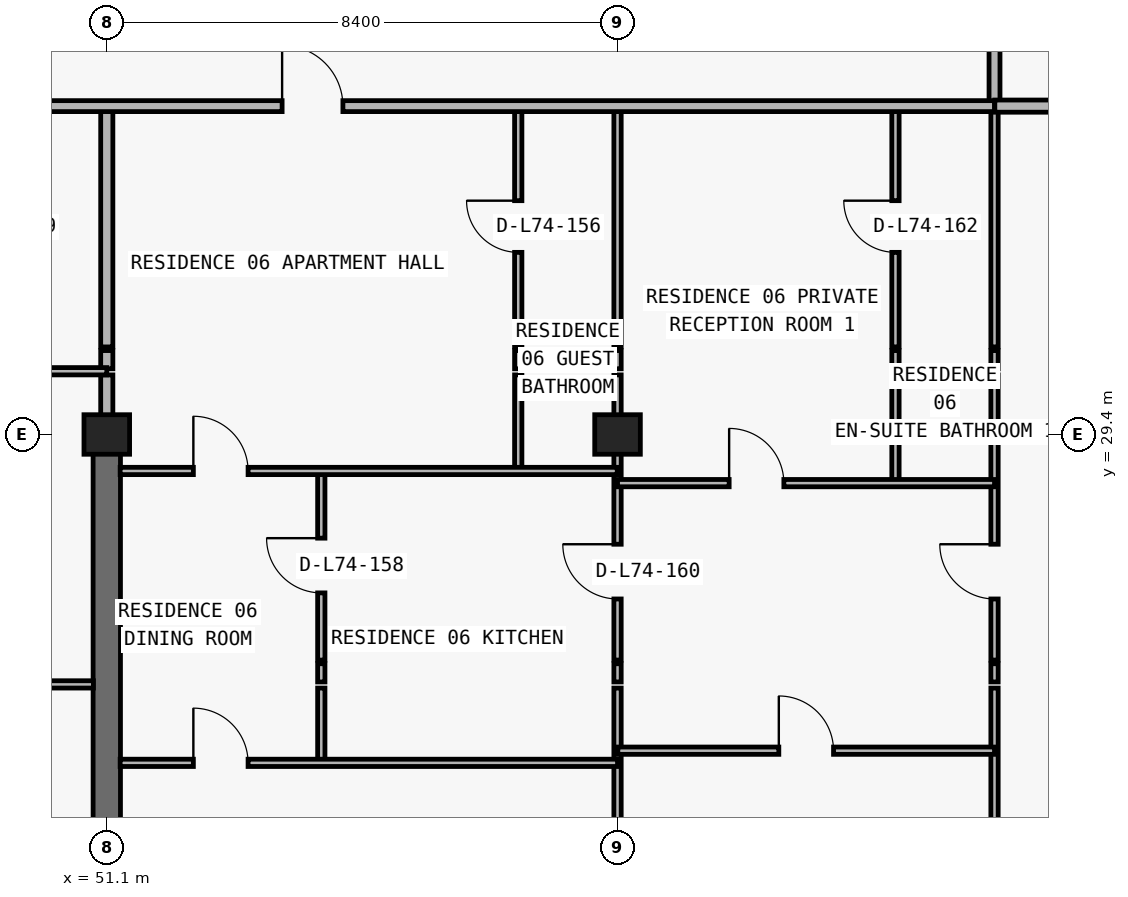
"""IFC4 building model, lengths in metres.
Left out: names, types, materials, properties, quantities, classifications, styles, units other than length and angle.
Written with IfcOpenShell. Run it as: python <this file> out.ifc"""

import sys

from ifc_helpers import new_model, si_unit, direction, frame, frame_2d, origin, origin_2d, place, context, subcontext, project, spatial, rectangle, extrude, element, fill, save


model = new_model("IFC4")
c1 = context("Model", 3, precision=1e-05, world=origin(), true_north=direction((0.0, 1.0)))
c2 = subcontext(c1, "Body", "Model", "MODEL_VIEW")
j1 = project(units=[si_unit("LENGTHUNIT", "METRE"), si_unit("PLANEANGLEUNIT", "RADIAN")], contexts=[c1])
p1 = place(None, origin())
s1 = spatial("IfcSite", under=j1, at=p1, CompositionType="ELEMENT")
p2 = place(p1, origin())
s2 = spatial("IfcBuilding", under=s1, at=p2, CompositionType="ELEMENT")
p3 = place(p2, frame((0.0, 0.0, 262.8)))
s3 = spatial("IfcBuildingStorey", under=s2, at=p3, CompositionType="ELEMENT", Elevation=262.8)
for number, where, z_axis, x_axis in (
    (1, (51.1, 29.4, 0.0), (0.0, 0.0, 1.0), (1.0, 0.0, 0.0)),
    (2, (59.5, 29.4, 0.0), (0.0, 0.0, 1.0), (1.0, 0.0, 0.0)),
):
    element("IfcColumn", number, at=place(p3, frame(where, z_axis=z_axis, x_axis=x_axis)), inside=s3, PredefinedType="COLUMN", context=c2, shape_type="SweptSolid", body=[
        extrude(rectangle(XDim=0.75, YDim=0.65, at=origin_2d()), origin(), (0.0, 0.0, 1.0), 3.05),
    ])
p4 = place(p3, frame((51.1, 20.8, 0.0), z_axis=(0.0, 0.0, 1.0), x_axis=(0.0, 1.0, 0.0)))
e3 = element("IfcWall", 3, at=p4, inside=s3, PredefinedType="SHEAR", context=c2, shape_type="SweptSolid", body=[
    extrude(rectangle(XDim=8.6, YDim=0.45, at=frame_2d((4.3, 0.0))), origin(), (0.0, 0.0, 1.0), 3.05),
])
p5 = place(p3, frame((51.1, 29.405, 0.0), z_axis=(0.0, 0.0, 1.0), x_axis=(0.0, 1.0, 0.0)))
e4 = element("IfcWall", 4, at=p5, inside=s3, PredefinedType="PARTITIONING", context=c2, shape_type="SweptSolid", body=[
    extrude(rectangle(XDim=0.975, YDim=0.2, at=frame_2d((0.487, 0.0))), origin(), (0.0, 0.0, 1.0), 2.335),
])
p6 = place(p3, frame((51.1, 30.48, 0.0), z_axis=(0.0, 0.0, 1.0), x_axis=(0.0, 1.0, 0.0)))
e5 = element("IfcWall", 5, at=p6, inside=s3, PredefinedType="PARTITIONING", context=c2, shape_type="SweptSolid", body=[
    extrude(rectangle(XDim=0.3, YDim=0.2, at=frame_2d((0.15, 0.0))), origin(), (0.0, 0.0, 1.0), 2.335),
])
p7 = place(p3, frame((51.1, 30.84, 0.0), z_axis=(0.0, 0.0, 1.0), x_axis=(0.0, 1.0, 0.0)))
e6 = element("IfcWall", 6, at=p7, inside=s3, PredefinedType="PARTITIONING", context=c2, shape_type="SweptSolid", body=[
    extrude(rectangle(XDim=3.96, YDim=0.2, at=frame_2d((1.98, 0.0))), origin(), (0.0, 0.0, 1.0), 2.335),
])
p8 = place(p3, frame((54.628, 24.0, 0.0), z_axis=(0.0, 0.0, 1.0), x_axis=(0.0, 1.0, 0.0)))
e7 = element("IfcWall", 7, at=p8, inside=s3, PredefinedType="PARTITIONING", context=c2, shape_type="SweptSolid", body=[
    extrude(rectangle(XDim=1.23, YDim=0.12, at=frame_2d((0.615, 0.0))), origin(), (0.0, 0.0, 1.0), 3.05),
])
p9 = place(p3, frame((54.628, 25.33, 0.0), z_axis=(0.0, 0.0, 1.0), x_axis=(0.0, 1.0, 0.0)))
e8 = element("IfcWall", 8, at=p9, inside=s3, PredefinedType="PARTITIONING", context=c2, shape_type="SweptSolid", body=[
    extrude(rectangle(XDim=0.3, YDim=0.12, at=frame_2d((0.15, 0.0))), origin(), (0.0, 0.0, 1.0), 3.05),
])
p10 = place(p3, frame((54.628, 25.69, 0.0), z_axis=(0.0, 0.0, 1.0), x_axis=(0.0, 1.0, 0.0)))
e9 = element("IfcWall", 9, at=p10, inside=s3, PredefinedType="PARTITIONING", context=c2, shape_type="SweptSolid", body=[
    extrude(rectangle(XDim=3.11, YDim=0.12, at=frame_2d((1.555, 0.0))), origin(), (0.0, 0.0, 1.0), 3.05),
])
p11 = place(p10, frame((1.105, 0.0, 0.0)))
e10 = element("IfcOpeningElement", 10, at=p11, cuts=e9, PredefinedType="OPENING", context=c2, shape_type="SweptSolid", body=[
    extrude(rectangle(XDim=0.9, YDim=2.15, at=frame_2d((0.45, 1.075))), frame((0.0, 0.07, 0.0), z_axis=(0.0, -1.0, 0.0), x_axis=(1.0, 0.0, 0.0)), (0.0, 0.0, 1.0), 0.14),
])
p12 = place(p3, frame((57.867, 28.8, 0.0), z_axis=(0.0, 0.0, 1.0), x_axis=(0.0, 1.0, 0.0)))
e11 = element("IfcWall", 11, at=p12, inside=s3, PredefinedType="PARTITIONING", context=c2, shape_type="SweptSolid", body=[
    extrude(rectangle(XDim=1.58, YDim=0.12, at=frame_2d((0.79, 0.0))), origin(), (0.0, 0.0, 1.0), 3.05),
])
p13 = place(p3, frame((57.867, 30.48, 0.0), z_axis=(0.0, 0.0, 1.0), x_axis=(0.0, 1.0, 0.0)))
e12 = element("IfcWall", 12, at=p13, inside=s3, PredefinedType="PARTITIONING", context=c2, shape_type="SweptSolid", body=[
    extrude(rectangle(XDim=0.3, YDim=0.12, at=frame_2d((0.15, 0.0))), origin(), (0.0, 0.0, 1.0), 3.05),
])
p14 = place(p3, frame((57.867, 30.84, 0.0), z_axis=(0.0, 0.0, 1.0), x_axis=(0.0, 1.0, 0.0)))
e13 = element("IfcWall", 13, at=p14, inside=s3, PredefinedType="PARTITIONING", context=c2, shape_type="SweptSolid", body=[
    extrude(rectangle(XDim=3.96, YDim=0.12, at=frame_2d((1.98, 0.0))), origin(), (0.0, 0.0, 1.0), 3.05),
])
p15 = place(p14, frame((1.555, 0.0, 0.0)))
e14 = element("IfcOpeningElement", 14, at=p15, cuts=e13, PredefinedType="OPENING", context=c2, shape_type="SweptSolid", body=[
    extrude(rectangle(XDim=0.85, YDim=2.1, at=frame_2d((0.425, 1.05))), frame((0.0, 0.07, 0.0), z_axis=(0.0, -1.0, 0.0), x_axis=(1.0, 0.0, 0.0)), (0.0, 0.0, 1.0), 0.14),
])
p16 = place(p3, frame((59.5, 13.34, 0.0), z_axis=(0.0, 0.0, 1.0), x_axis=(0.0, 1.0, 0.0)))
e15 = element("IfcWall", 15, at=p16, inside=s3, PredefinedType="PARTITIONING", context=c2, shape_type="SweptSolid", body=[
    extrude(rectangle(XDim=11.89, YDim=0.12, at=frame_2d((5.945, 0.0))), origin(), (0.0, 0.0, 1.0), 2.263),
])
p17 = place(p3, frame((59.5, 25.33, 0.0), z_axis=(0.0, 0.0, 1.0), x_axis=(0.0, 1.0, 0.0)))
e16 = element("IfcWall", 16, at=p17, inside=s3, PredefinedType="PARTITIONING", context=c2, shape_type="SweptSolid", body=[
    extrude(rectangle(XDim=0.3, YDim=0.12, at=frame_2d((0.15, 0.0))), origin(), (0.0, 0.0, 1.0), 2.263),
])
p18 = place(p3, frame((59.5, 25.69, 0.0), z_axis=(0.0, 0.0, 1.0), x_axis=(0.0, 1.0, 0.0)))
e17 = element("IfcWall", 17, at=p18, inside=s3, PredefinedType="PARTITIONING", context=c2, shape_type="SweptSolid", body=[
    extrude(rectangle(XDim=4.69, YDim=0.12, at=frame_2d((2.345, 0.0))), origin(), (0.0, 0.0, 1.0), 2.263),
])
p19 = place(p18, frame((1.005, 0.0, 0.0)))
e18 = element("IfcOpeningElement", 18, at=p19, cuts=e17, PredefinedType="OPENING", context=c2, shape_type="SweptSolid", body=[
    extrude(rectangle(XDim=0.9, YDim=2.15, at=frame_2d((0.45, 1.075))), frame((0.0, 0.07, 0.0), z_axis=(0.0, -1.0, 0.0), x_axis=(1.0, 0.0, 0.0)), (0.0, 0.0, 1.0), 0.14),
])
p20 = place(p3, frame((59.5, 30.48, 0.0), z_axis=(0.0, 0.0, 1.0), x_axis=(0.0, 1.0, 0.0)))
e19 = element("IfcWall", 19, at=p20, inside=s3, PredefinedType="PARTITIONING", context=c2, shape_type="SweptSolid", body=[
    extrude(rectangle(XDim=0.3, YDim=0.12, at=frame_2d((0.15, 0.0))), origin(), (0.0, 0.0, 1.0), 2.263),
])
p21 = place(p3, frame((59.5, 30.84, 0.0), z_axis=(0.0, 0.0, 1.0), x_axis=(0.0, 1.0, 0.0)))
e20 = element("IfcWall", 20, at=p21, inside=s3, PredefinedType="PARTITIONING", context=c2, shape_type="SweptSolid", body=[
    extrude(rectangle(XDim=3.96, YDim=0.12, at=frame_2d((1.98, 0.0))), origin(), (0.0, 0.0, 1.0), 2.263),
])
p22 = place(p3, frame((64.071, 28.6, 0.0), z_axis=(0.0, 0.0, 1.0), x_axis=(0.0, 1.0, 0.0)))
e21 = element("IfcWall", 21, at=p22, inside=s3, PredefinedType="PARTITIONING", context=c2, shape_type="SweptSolid", body=[
    extrude(rectangle(XDim=1.78, YDim=0.12, at=frame_2d((0.89, 0.0))), origin(), (0.0, 0.0, 1.0), 3.05),
])
p23 = place(p3, frame((64.071, 30.48, 0.0), z_axis=(0.0, 0.0, 1.0), x_axis=(0.0, 1.0, 0.0)))
e22 = element("IfcWall", 22, at=p23, inside=s3, PredefinedType="PARTITIONING", context=c2, shape_type="SweptSolid", body=[
    extrude(rectangle(XDim=0.3, YDim=0.12, at=frame_2d((0.15, 0.0))), origin(), (0.0, 0.0, 1.0), 3.05),
])
p24 = place(p3, frame((64.071, 30.84, 0.0), z_axis=(0.0, 0.0, 1.0), x_axis=(0.0, 1.0, 0.0)))
e23 = element("IfcWall", 23, at=p24, inside=s3, PredefinedType="PARTITIONING", context=c2, shape_type="SweptSolid", body=[
    extrude(rectangle(XDim=3.96, YDim=0.12, at=frame_2d((1.98, 0.0))), origin(), (0.0, 0.0, 1.0), 3.05),
])
p25 = place(p24, frame((1.555, 0.0, 0.0)))
e24 = element("IfcOpeningElement", 24, at=p25, cuts=e23, PredefinedType="OPENING", context=c2, shape_type="SweptSolid", body=[
    extrude(rectangle(XDim=0.85, YDim=2.1, at=frame_2d((0.425, 1.05))), frame((0.0, 0.07, 0.0), z_axis=(0.0, -1.0, 0.0), x_axis=(1.0, 0.0, 0.0)), (0.0, 0.0, 1.0), 0.14),
])
p26 = place(p3, frame((65.7, 13.42, 0.0), z_axis=(0.0, 0.0, 1.0), x_axis=(0.0, 1.0, 0.0)))
e25 = element("IfcWall", 25, at=p26, inside=s3, PredefinedType="PARTITIONING", context=c2, shape_type="SweptSolid", body=[
    extrude(rectangle(XDim=11.81, YDim=0.12, at=frame_2d((5.905, 0.0))), origin(), (0.0, 0.0, 1.0), 2.629),
])
p27 = place(p3, frame((65.7, 25.33, 0.0), z_axis=(0.0, 0.0, 1.0), x_axis=(0.0, 1.0, 0.0)))
e26 = element("IfcWall", 26, at=p27, inside=s3, PredefinedType="PARTITIONING", context=c2, shape_type="SweptSolid", body=[
    extrude(rectangle(XDim=0.3, YDim=0.12, at=frame_2d((0.15, 0.0))), origin(), (0.0, 0.0, 1.0), 2.629),
])
p28 = place(p3, frame((65.7, 25.69, 0.0), z_axis=(0.0, 0.0, 1.0), x_axis=(0.0, 1.0, 0.0)))
e27 = element("IfcWall", 27, at=p28, inside=s3, PredefinedType="PARTITIONING", context=c2, shape_type="SweptSolid", body=[
    extrude(rectangle(XDim=4.69, YDim=0.12, at=frame_2d((2.345, 0.0))), origin(), (0.0, 0.0, 1.0), 2.629),
])
p29 = place(p28, frame((1.005, 0.0, 0.0)))
e28 = element("IfcOpeningElement", 28, at=p29, cuts=e27, PredefinedType="OPENING", context=c2, shape_type="SweptSolid", body=[
    extrude(rectangle(XDim=0.9, YDim=2.15, at=frame_2d((0.45, 1.075))), frame((0.0, 0.07, 0.0), z_axis=(0.0, -1.0, 0.0), x_axis=(1.0, 0.0, 0.0)), (0.0, 0.0, 1.0), 0.14),
])
p30 = place(p3, frame((65.7, 30.48, 0.0), z_axis=(0.0, 0.0, 1.0), x_axis=(0.0, 1.0, 0.0)))
e29 = element("IfcWall", 29, at=p30, inside=s3, PredefinedType="PARTITIONING", context=c2, shape_type="SweptSolid", body=[
    extrude(rectangle(XDim=0.3, YDim=0.12, at=frame_2d((0.15, 0.0))), origin(), (0.0, 0.0, 1.0), 2.629),
])
p31 = place(p3, frame((65.7, 30.84, 0.0), z_axis=(0.0, 0.0, 1.0), x_axis=(0.0, 1.0, 0.0)))
e30 = element("IfcWall", 30, at=p31, inside=s3, PredefinedType="PARTITIONING", context=c2, shape_type="SweptSolid", body=[
    extrude(rectangle(XDim=3.96, YDim=0.12, at=frame_2d((1.98, 0.0))), origin(), (0.0, 0.0, 1.0), 2.629),
])
p32 = place(p3, frame((65.7, 34.805, 0.0), z_axis=(0.0, 0.0, 1.0), x_axis=(0.0, 1.0, 0.0)))
e31 = element("IfcWall", 31, at=p32, inside=s3, PredefinedType="PARTITIONING", context=c2, shape_type="SweptSolid", body=[
    extrude(rectangle(XDim=2.195, YDim=0.18, at=frame_2d((1.098, 0.0))), origin(), (0.0, 0.0, 1.0), 2.629),
])
p33 = place(p3, frame((51.32, 24.0, 0.0), z_axis=(0.0, 0.0, 1.0), x_axis=(1.0, 0.0, 0.0)))
e32 = element("IfcWall", 32, at=p33, inside=s3, PredefinedType="PARTITIONING", context=c2, shape_type="SweptSolid", body=[
    extrude(rectangle(XDim=8.18, YDim=0.12, at=frame_2d((4.09, 0.0))), origin(), (0.0, 0.0, 1.0), 3.05),
])
p34 = place(p33, frame((1.204, 0.0, 0.0)))
e33 = element("IfcOpeningElement", 33, at=p34, cuts=e32, PredefinedType="OPENING", context=c2, shape_type="SweptSolid", body=[
    extrude(rectangle(XDim=0.9, YDim=2.15, at=frame_2d((0.45, 1.075))), frame((0.0, 0.07, 0.0), z_axis=(0.0, -1.0, 0.0), x_axis=(1.0, 0.0, 0.0)), (0.0, 0.0, 1.0), 0.14),
])
p35 = place(p3, frame((59.505, 24.2, 0.0), z_axis=(0.0, 0.0, 1.0), x_axis=(1.0, 0.0, 0.0)))
e34 = element("IfcWall", 34, at=p35, inside=s3, PredefinedType="PARTITIONING", context=c2, shape_type="SweptSolid", body=[
    extrude(rectangle(XDim=6.195, YDim=0.12, at=frame_2d((3.098, 0.0))), origin(), (0.0, 0.0, 1.0), 3.05),
])
p36 = place(p35, frame((2.647, 0.0, 0.0)))
e35 = element("IfcOpeningElement", 35, at=p36, cuts=e34, PredefinedType="OPENING", context=c2, shape_type="SweptSolid", body=[
    extrude(rectangle(XDim=0.9, YDim=2.15, at=frame_2d((0.45, 1.075))), frame((0.0, 0.07, 0.0), z_axis=(0.0, -1.0, 0.0), x_axis=(1.0, 0.0, 0.0)), (0.0, 0.0, 1.0), 0.14),
])
p37 = place(p3, frame((42.7, 25.29, 0.0), z_axis=(0.0, 0.0, 1.0), x_axis=(1.0, 0.0, 0.0)))
e36 = element("IfcWall", 36, at=p37, inside=s3, PredefinedType="PARTITIONING", context=c2, shape_type="SweptSolid", body=[
    extrude(rectangle(XDim=8.18, YDim=0.12, at=frame_2d((4.09, 0.0))), origin(), (0.0, 0.0, 1.0), 3.05),
])
p38 = place(p37, frame((1.524, 0.0, 0.0)))
e37 = element("IfcOpeningElement", 37, at=p38, cuts=e36, PredefinedType="OPENING", context=c2, shape_type="SweptSolid", body=[
    extrude(rectangle(XDim=0.9, YDim=2.15, at=frame_2d((0.45, 1.075))), frame((0.0, 0.07, 0.0), z_axis=(0.0, -1.0, 0.0), x_axis=(1.0, 0.0, 0.0)), (0.0, 0.0, 1.0), 0.14),
])
p39 = place(p37, frame((5.908, 0.0, 0.0)))
e38 = element("IfcOpeningElement", 38, at=p39, cuts=e36, PredefinedType="OPENING", context=c2, shape_type="SweptSolid", body=[
    extrude(rectangle(XDim=0.9, YDim=2.15, at=frame_2d((0.45, 1.075))), frame((0.0, 0.07, 0.0), z_axis=(0.0, -1.0, 0.0), x_axis=(1.0, 0.0, 0.0)), (0.0, 0.0, 1.0), 0.14),
])
p40 = place(p3, frame((59.5, 28.6, 0.0), z_axis=(0.0, 0.0, 1.0), x_axis=(1.0, 0.0, 0.0)))
e39 = element("IfcWall", 39, at=p40, inside=s3, PredefinedType="PARTITIONING", context=c2, shape_type="SweptSolid", body=[
    extrude(rectangle(XDim=6.2, YDim=0.12, at=frame_2d((3.1, 0.0))), origin(), (0.0, 0.0, 1.0), 3.05),
])
p41 = place(p40, frame((1.835, 0.0, 0.0)))
e40 = element("IfcOpeningElement", 40, at=p41, cuts=e39, PredefinedType="OPENING", context=c2, shape_type="SweptSolid", body=[
    extrude(rectangle(XDim=0.9, YDim=2.15, at=frame_2d((0.45, 1.075))), frame((0.0, 0.07, 0.0), z_axis=(0.0, -1.0, 0.0), x_axis=(1.0, 0.0, 0.0)), (0.0, 0.0, 1.0), 0.14),
])
p42 = place(p3, frame((51.32, 28.8, 0.0), z_axis=(0.0, 0.0, 1.0), x_axis=(1.0, 0.0, 0.0)))
e41 = element("IfcWall", 41, at=p42, inside=s3, PredefinedType="PARTITIONING", context=c2, shape_type="SweptSolid", body=[
    extrude(rectangle(XDim=8.175, YDim=0.12, at=frame_2d((4.087, 0.0))), origin(), (0.0, 0.0, 1.0), 3.05),
])
p43 = place(p42, frame((1.204, 0.0, 0.0)))
e42 = element("IfcOpeningElement", 42, at=p43, cuts=e41, PredefinedType="OPENING", context=c2, shape_type="SweptSolid", body=[
    extrude(rectangle(XDim=0.9, YDim=2.15, at=frame_2d((0.45, 1.075))), frame((0.0, 0.07, 0.0), z_axis=(0.0, -1.0, 0.0), x_axis=(1.0, 0.0, 0.0)), (0.0, 0.0, 1.0), 0.14),
])
p44 = place(p3, frame((42.7, 30.44, 0.0), z_axis=(0.0, 0.0, 1.0), x_axis=(1.0, 0.0, 0.0)))
e43 = element("IfcWall", 43, at=p44, inside=s3, PredefinedType="PARTITIONING", context=c2, shape_type="SweptSolid", body=[
    extrude(rectangle(XDim=8.4, YDim=0.12, at=frame_2d((4.2, 0.0))), origin(), (0.0, 0.0, 1.0), 3.05),
])
p45 = place(p44, frame((1.818, 0.0, 0.0)))
e44 = element("IfcOpeningElement", 44, at=p45, cuts=e43, PredefinedType="OPENING", context=c2, shape_type="SweptSolid", body=[
    extrude(rectangle(XDim=0.9, YDim=2.15, at=frame_2d((0.45, 1.075))), frame((0.0, 0.07, 0.0), z_axis=(0.0, -1.0, 0.0), x_axis=(1.0, 0.0, 0.0)), (0.0, 0.0, 1.0), 0.14),
])
p46 = place(p3, frame((31.5, 34.8, 0.0), z_axis=(0.0, 0.0, 1.0), x_axis=(1.0, 0.0, 0.0)))
e45 = element("IfcWall", 45, at=p46, inside=s3, PredefinedType="PARTITIONING", context=c2, shape_type="SweptSolid", body=[
    extrude(rectangle(XDim=34.2, YDim=0.18, at=frame_2d((17.1, 0.0))), origin(), (0.0, 0.0, 1.0), 3.05),
])
p47 = place(p46, frame((5.6, 0.0, 0.0)))
e46 = element("IfcOpeningElement", 46, at=p47, cuts=e45, PredefinedType="OPENING", context=c2, shape_type="SweptSolid", body=[
    extrude(rectangle(XDim=1.0, YDim=2.2, at=frame_2d((0.5, 1.1))), frame((0.0, 0.1, 0.0), z_axis=(0.0, -1.0, 0.0), x_axis=(1.0, 0.0, 0.0)), (0.0, 0.0, 1.0), 0.2),
])
p48 = place(p46, frame((13.799, 0.0, 0.0)))
e47 = element("IfcOpeningElement", 47, at=p48, cuts=e45, PredefinedType="OPENING", context=c2, shape_type="SweptSolid", body=[
    extrude(rectangle(XDim=1.0, YDim=2.2, at=frame_2d((0.5, 1.1))), frame((0.0, 0.1, 0.0), z_axis=(0.0, -1.0, 0.0), x_axis=(1.0, 0.0, 0.0)), (0.0, 0.0, 1.0), 0.2),
])
p49 = place(p46, frame((22.483, 0.0, 0.0)))
e48 = element("IfcOpeningElement", 48, at=p49, cuts=e45, PredefinedType="OPENING", context=c2, shape_type="SweptSolid", body=[
    extrude(rectangle(XDim=1.0, YDim=2.2, at=frame_2d((0.5, 1.1))), frame((0.0, 0.1, 0.0), z_axis=(0.0, -1.0, 0.0), x_axis=(1.0, 0.0, 0.0)), (0.0, 0.0, 1.0), 0.2),
])
p50 = place(p3, frame((65.705, 34.8, 0.0), z_axis=(0.0, 0.0, 1.0), x_axis=(1.0, 0.0, 0.0)))
e49 = element("IfcWall", 49, at=p50, inside=s3, PredefinedType="PARTITIONING", context=c2, shape_type="SweptSolid", body=[
    extrude(rectangle(XDim=3.7, YDim=0.2, at=frame_2d((1.85, 0.0))), origin(), (0.0, 0.0, 1.0), 3.05),
])
p51 = place(p49, origin())
e50 = element("IfcDoor", 50, at=p51, inside=s3, OperationType="SINGLE_SWING_LEFT", PredefinedType="DOOR", context=c2, shape_type="SweptSolid", body=[
    extrude(rectangle(XDim=1.0, YDim=2.2, at=frame_2d((0.5, 1.1))), frame((0.0, 0.025, 0.0), z_axis=(0.0, -1.0, 0.0), x_axis=(1.0, 0.0, 0.0)), (0.0, 0.0, 1.0), 0.05),
])
fill(e48, e50)
p52 = place(p15, origin())
e51 = element("IfcDoor", 51, at=p52, inside=s3, OperationType="SINGLE_SWING_RIGHT", PredefinedType="DOOR", context=c2, shape_type="SweptSolid", body=[
    extrude(rectangle(XDim=0.85, YDim=2.1, at=frame_2d((0.425, 1.05))), frame((0.0, 0.025, 0.0), z_axis=(0.0, -1.0, 0.0), x_axis=(1.0, 0.0, 0.0)), (0.0, 0.0, 1.0), 0.05),
])
fill(e14, e51)
p53 = place(p43, origin())
e52 = element("IfcDoor", 52, at=p53, inside=s3, OperationType="SINGLE_SWING_LEFT", PredefinedType="DOOR", context=c2, shape_type="SweptSolid", body=[
    extrude(rectangle(XDim=0.9, YDim=2.15, at=frame_2d((0.45, 1.075))), frame((0.0, 0.025, 0.0), z_axis=(0.0, -1.0, 0.0), x_axis=(1.0, 0.0, 0.0)), (0.0, 0.0, 1.0), 0.05),
])
fill(e42, e52)
p54 = place(p11, origin())
e53 = element("IfcDoor", 53, at=p54, inside=s3, OperationType="SINGLE_SWING_RIGHT", PredefinedType="DOOR", context=c2, shape_type="SweptSolid", body=[
    extrude(rectangle(XDim=0.9, YDim=2.15, at=frame_2d((0.45, 1.075))), frame((0.0, 0.025, 0.0), z_axis=(0.0, -1.0, 0.0), x_axis=(1.0, 0.0, 0.0)), (0.0, 0.0, 1.0), 0.05),
])
fill(e10, e53)
p55 = place(p34, origin())
e54 = element("IfcDoor", 54, at=p55, inside=s3, OperationType="SINGLE_SWING_LEFT", PredefinedType="DOOR", context=c2, shape_type="SweptSolid", body=[
    extrude(rectangle(XDim=0.9, YDim=2.15, at=frame_2d((0.45, 1.075))), frame((0.0, 0.025, 0.0), z_axis=(0.0, -1.0, 0.0), x_axis=(1.0, 0.0, 0.0)), (0.0, 0.0, 1.0), 0.05),
])
fill(e33, e54)
p56 = place(p19, origin())
e55 = element("IfcDoor", 55, at=p56, inside=s3, OperationType="SINGLE_SWING_RIGHT", PredefinedType="DOOR", context=c2, shape_type="SweptSolid", body=[
    extrude(rectangle(XDim=0.9, YDim=2.15, at=frame_2d((0.45, 1.075))), frame((0.0, 0.025, 0.0), z_axis=(0.0, -1.0, 0.0), x_axis=(1.0, 0.0, 0.0)), (0.0, 0.0, 1.0), 0.05),
])
fill(e18, e55)
p57 = place(p41, origin())
e56 = element("IfcDoor", 56, at=p57, inside=s3, OperationType="SINGLE_SWING_LEFT", PredefinedType="DOOR", context=c2, shape_type="SweptSolid", body=[
    extrude(rectangle(XDim=0.9, YDim=2.15, at=frame_2d((0.45, 1.075))), frame((0.0, 0.025, 0.0), z_axis=(0.0, -1.0, 0.0), x_axis=(1.0, 0.0, 0.0)), (0.0, 0.0, 1.0), 0.05),
])
fill(e40, e56)
p58 = place(p25, origin())
e57 = element("IfcDoor", 57, at=p58, inside=s3, OperationType="SINGLE_SWING_RIGHT", PredefinedType="DOOR", context=c2, shape_type="SweptSolid", body=[
    extrude(rectangle(XDim=0.85, YDim=2.1, at=frame_2d((0.425, 1.05))), frame((0.0, 0.025, 0.0), z_axis=(0.0, -1.0, 0.0), x_axis=(1.0, 0.0, 0.0)), (0.0, 0.0, 1.0), 0.05),
])
fill(e24, e57)
p59 = place(p36, origin())
e58 = element("IfcDoor", 58, at=p59, inside=s3, OperationType="SINGLE_SWING_LEFT", PredefinedType="DOOR", context=c2, shape_type="SweptSolid", body=[
    extrude(rectangle(XDim=0.9, YDim=2.15, at=frame_2d((0.45, 1.075))), frame((0.0, 0.025, 0.0), z_axis=(0.0, -1.0, 0.0), x_axis=(1.0, 0.0, 0.0)), (0.0, 0.0, 1.0), 0.05),
])
fill(e35, e58)
p60 = place(p29, origin())
e59 = element("IfcDoor", 59, at=p60, inside=s3, OperationType="SINGLE_SWING_RIGHT", PredefinedType="DOOR", context=c2, shape_type="SweptSolid", body=[
    extrude(rectangle(XDim=0.9, YDim=2.15, at=frame_2d((0.45, 1.075))), frame((0.0, 0.025, 0.0), z_axis=(0.0, -1.0, 0.0), x_axis=(1.0, 0.0, 0.0)), (0.0, 0.0, 1.0), 0.05),
])
fill(e28, e59)
save(model, sys.argv[1])
